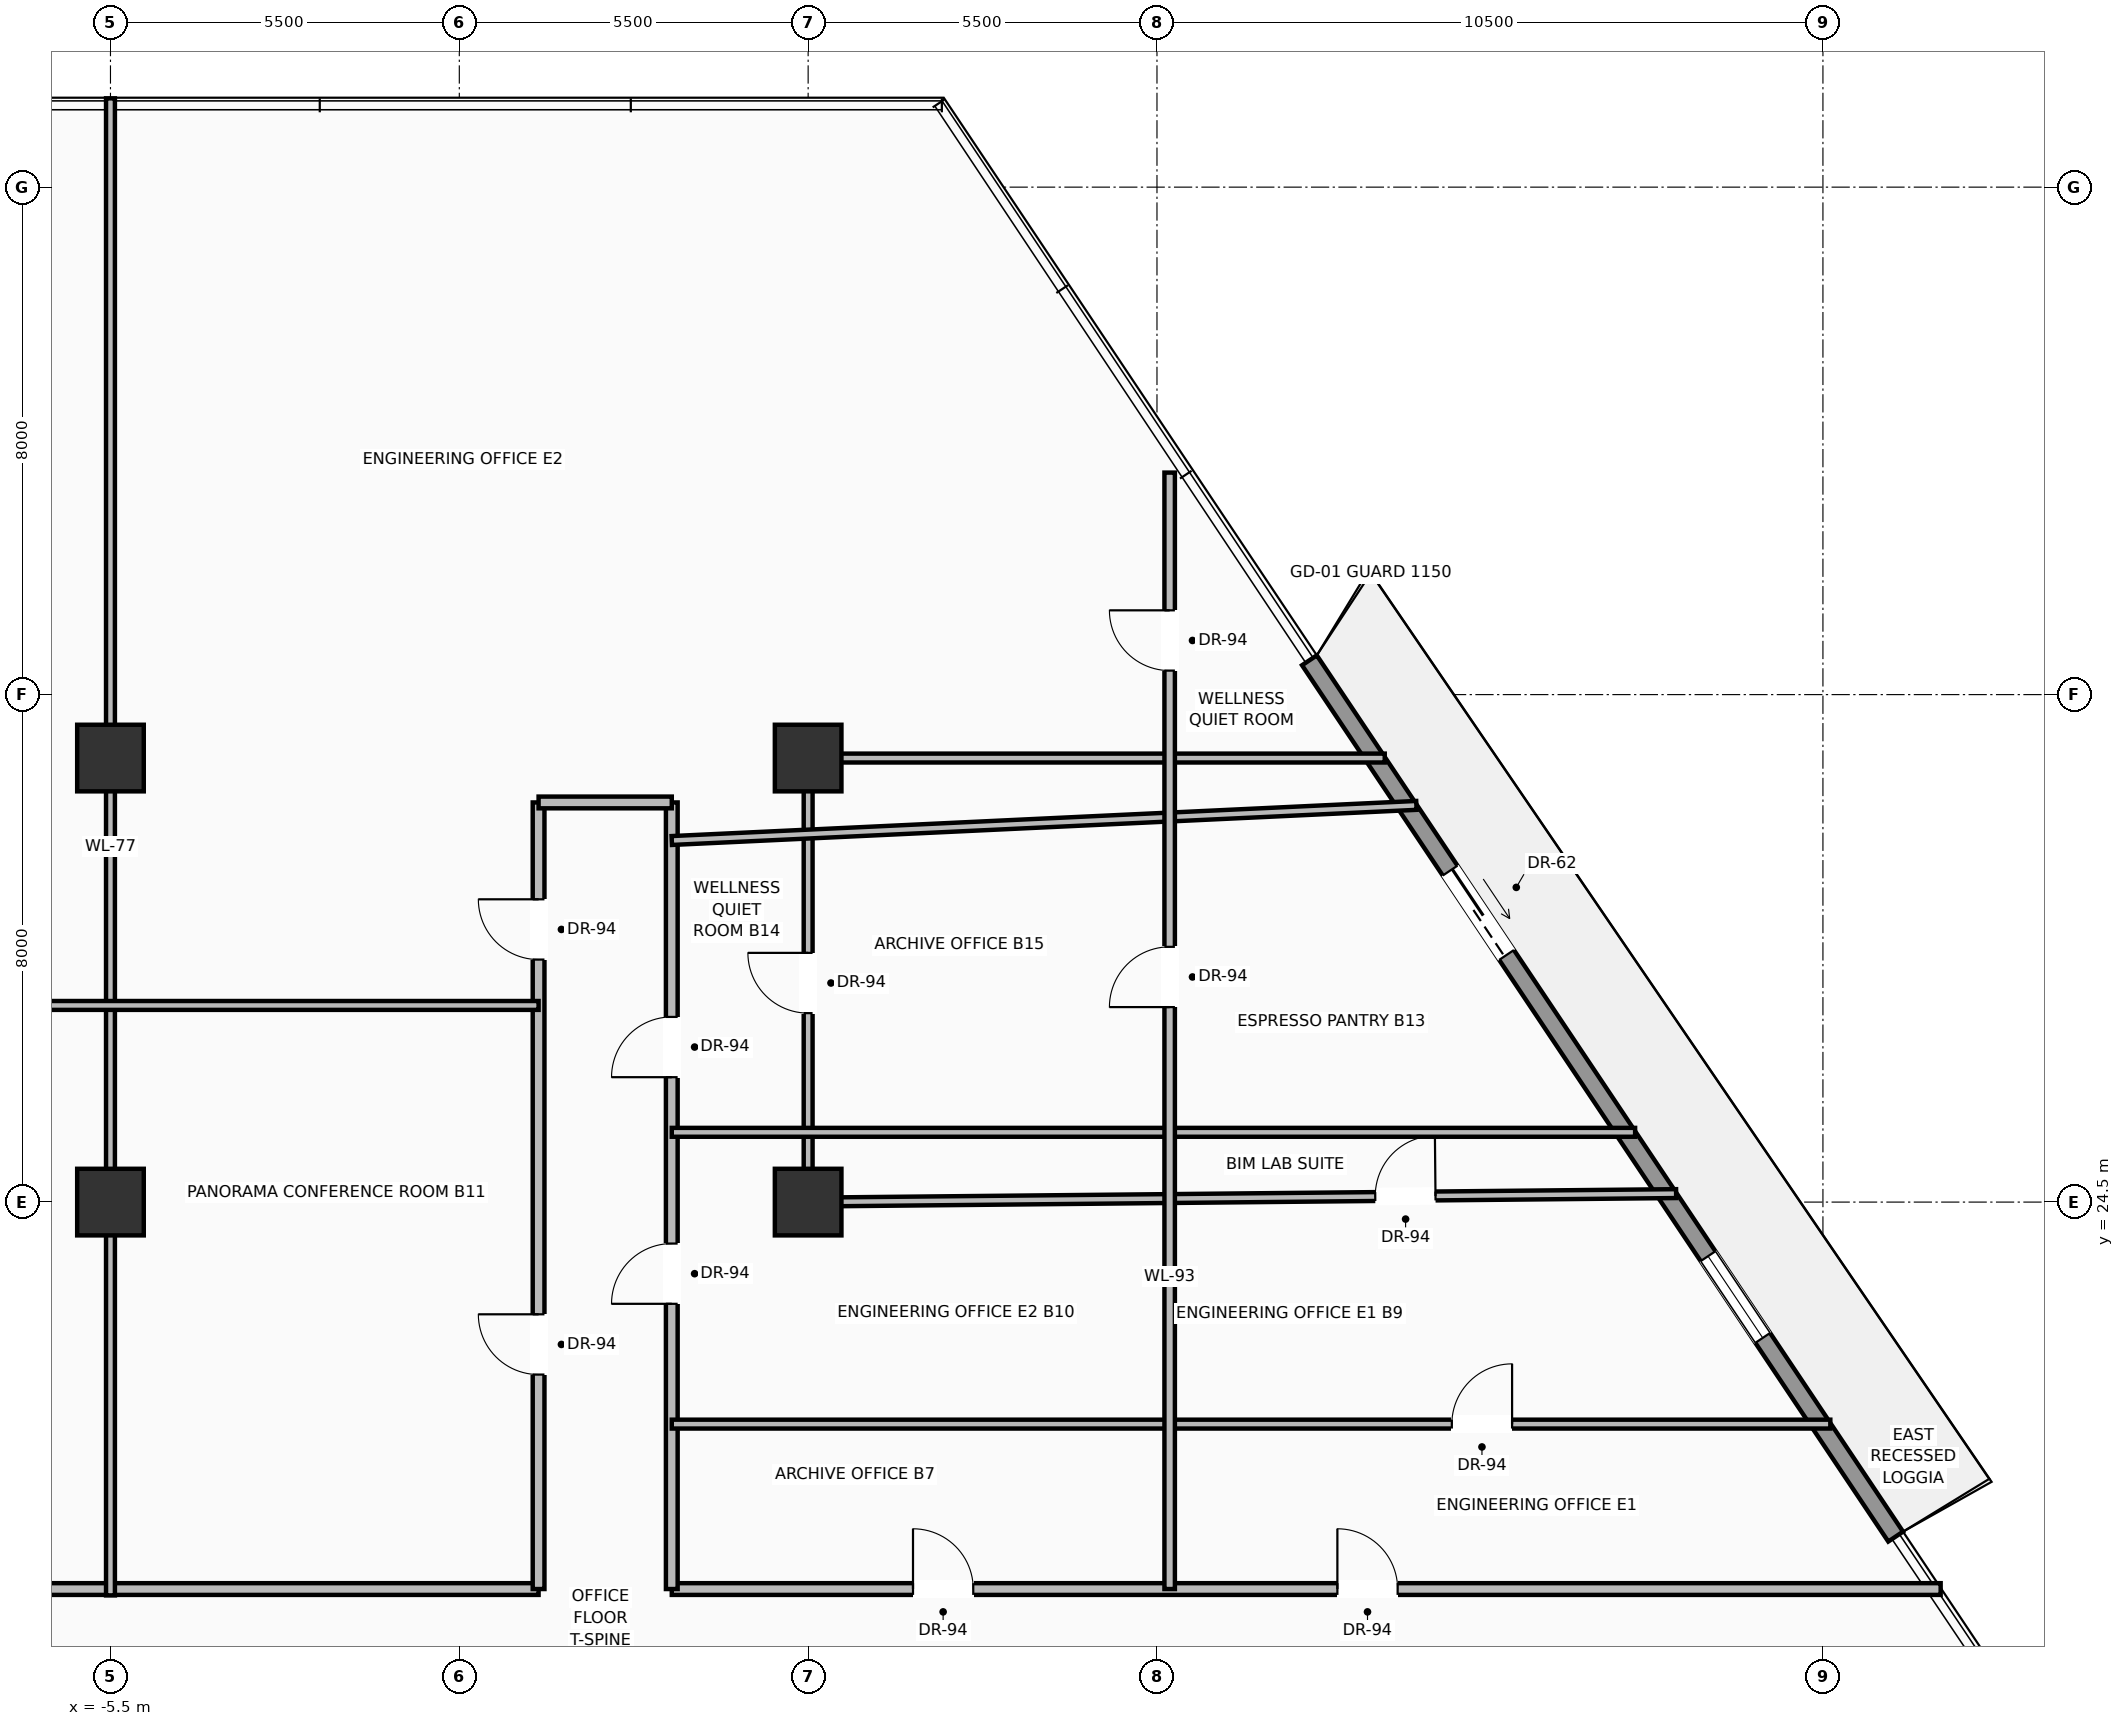
"""IFC4 building model, lengths in metres.
Left out: names, types, materials, properties, quantities, classifications, styles, units other than length and angle.
Written with IfcOpenShell. Run it as: python <this file> out.ifc"""

import sys

from ifc_helpers import new_model, si_unit, direction, frame, frame_2d, origin, origin_2d, place, context, subcontext, project, spatial, rectangle, extrude, source, transform, mapped, element, fill, save


model = new_model("IFC4")
c1 = context("Model", 3, precision=1e-05, world=origin(), true_north=direction((0.0, 1.0)))
c2 = subcontext(c1, "Body", "Model", "MODEL_VIEW")
j1 = project(units=[si_unit("LENGTHUNIT", "METRE"), si_unit("PLANEANGLEUNIT", "RADIAN")], contexts=[c1])
p1 = place(None, origin())
s1 = spatial("IfcSite", under=j1, at=p1, CompositionType="ELEMENT")
p2 = place(p1, origin())
s2 = spatial("IfcBuilding", under=s1, at=p2, CompositionType="ELEMENT")
p3 = place(p2, frame((0.0, 0.0, 49.7)))
s3 = spatial("IfcBuildingStorey", under=s2, at=p3, CompositionType="ELEMENT", Elevation=49.7)
m1 = source(origin(), c2, "Body", "SweptSolid", [
    extrude(rectangle(XDim=1.05, YDim=1.05, at=origin_2d()), origin(), (0.0, 0.0, 1.0), 3.7),
])
for number, where, z_axis, x_axis in (
    (1, (-5.5, 24.5, 0.0), (0.0, 0.0, 1.0), (1.0, 0.0, 0.0)),
    (2, (5.5, 24.5, 0.0), (0.0, 0.0, 1.0), (1.0, 0.0, 0.0)),
    (3, (-5.5, 31.5, 0.0), (0.0, 0.0, 1.0), (1.0, 0.0, 0.0)),
    (4, (5.5, 31.5, 0.0), (0.0, 0.0, 1.0), (1.0, 0.0, 0.0)),
):
    element("IfcColumn", number, at=place(p3, frame(where, z_axis=z_axis, x_axis=x_axis)), inside=s3, PredefinedType="COLUMN", context=c2, shape_type="MappedRepresentation", body=[
        mapped(m1, transform((0.0, 0.0, 0.0), scale=1.0)),
    ])
p4 = place(p3, frame((13.404, 33.041, 0.0), z_axis=(0.0, 0.0, 1.0), x_axis=(0.556075632993, -0.831131692569, 0.0)))
e5 = element("IfcWall", 5, at=p4, inside=s3, PredefinedType="SOLIDWALL", context=c2, shape_type="SweptSolid", body=[
    extrude(rectangle(XDim=16.621, YDim=0.28, at=frame_2d((8.311, 0.0))), origin(), (0.0, 0.0, 1.0), 3.03),
])
p5 = place(p4, frame((3.989, 0.0, 0.0)))
e6 = element("IfcOpeningElement", 6, at=p5, cuts=e5, PredefinedType="OPENING", context=c2, shape_type="SweptSolid", body=[
    extrude(rectangle(XDim=1.6, YDim=2.35, at=frame_2d((0.8, 1.175))), frame((0.0, 0.15, 0.0), z_axis=(0.0, -1.0, 0.0), x_axis=(1.0, 0.0, 0.0)), (0.0, 0.0, 1.0), 0.3),
])
p6 = place(p4, frame((11.302, 0.0, 0.9)))
e7 = element("IfcOpeningElement", 7, at=p6, cuts=e5, PredefinedType="OPENING", context=c2, shape_type="SweptSolid", body=[
    extrude(rectangle(XDim=1.55, YDim=1.85, at=frame_2d((0.775, 0.925))), frame((0.0, 0.15, 0.0), z_axis=(0.0, -1.0, 0.0), x_axis=(1.0, 0.0, 0.0)), (0.0, 0.0, 1.0), 0.3),
])
p7 = place(p3, frame((-23.135, 18.4, 0.0), z_axis=(0.0, 0.0, 1.0), x_axis=(1.0, 0.0, 0.0)))
e8 = element("IfcWall", 8, at=p7, inside=s3, PredefinedType="PARTITIONING", context=c2, shape_type="SweptSolid", body=[
    extrude(rectangle(XDim=24.385, YDim=0.185, at=frame_2d((12.192, 0.0))), origin(), (0.0, 0.0, 1.0), 2.747),
])
p8 = place(p7, frame((10.532, 0.0, 0.0)))
e9 = element("IfcOpeningElement", 9, at=p8, cuts=e8, PredefinedType="OPENING", context=c2, shape_type="SweptSolid", body=[
    extrude(rectangle(XDim=0.95, YDim=2.2, at=frame_2d((0.475, 1.1))), frame((0.0, 0.103, 0.0), z_axis=(0.0, -1.0, 0.0), x_axis=(1.0, 0.0, 0.0)), (0.0, 0.0, 1.0), 0.205),
])
p9 = place(p3, frame((3.35, 18.4, 0.0), z_axis=(0.0, 0.0, 1.0), x_axis=(1.0, 0.0, 0.0)))
e10 = element("IfcWall", 10, at=p9, inside=s3, PredefinedType="PARTITIONING", context=c2, shape_type="SweptSolid", body=[
    extrude(rectangle(XDim=20.006, YDim=0.185, at=frame_2d((10.003, 0.0))), origin(), (0.0, 0.0, 1.0), 2.747),
])
p10 = place(p9, frame((10.494, 0.0, 0.0)))
e11 = element("IfcOpeningElement", 11, at=p10, cuts=e10, PredefinedType="OPENING", context=c2, shape_type="SweptSolid", body=[
    extrude(rectangle(XDim=0.95, YDim=2.2, at=frame_2d((0.475, 1.1))), frame((0.0, 0.103, 0.0), z_axis=(0.0, -1.0, 0.0), x_axis=(1.0, 0.0, 0.0)), (0.0, 0.0, 1.0), 0.205),
])
p11 = place(p9, frame((3.803, 0.0, 0.0)))
e12 = element("IfcOpeningElement", 12, at=p11, cuts=e10, PredefinedType="OPENING", context=c2, shape_type="SweptSolid", body=[
    extrude(rectangle(XDim=0.95, YDim=2.2, at=frame_2d((0.475, 1.1))), frame((0.0, 0.103, 0.0), z_axis=(0.0, -1.0, 0.0), x_axis=(1.0, 0.0, 0.0)), (0.0, 0.0, 1.0), 0.205),
])
p12 = place(p3, frame((1.25, 18.4, 0.0), z_axis=(0.0, 0.0, 1.0), x_axis=(0.0, 1.0, 0.0)))
e13 = element("IfcWall", 13, at=p12, inside=s3, PredefinedType="PARTITIONING", context=c2, shape_type="SweptSolid", body=[
    extrude(rectangle(XDim=12.4, YDim=0.185, at=frame_2d((6.2, 0.0))), origin(), (0.0, 0.0, 1.0), 2.747),
])
p13 = place(p12, frame((3.381, 0.0, 0.0)))
e14 = element("IfcOpeningElement", 14, at=p13, cuts=e13, PredefinedType="OPENING", context=c2, shape_type="SweptSolid", body=[
    extrude(rectangle(XDim=0.95, YDim=2.2, at=frame_2d((0.475, 1.1))), frame((0.0, 0.103, 0.0), z_axis=(0.0, -1.0, 0.0), x_axis=(1.0, 0.0, 0.0)), (0.0, 0.0, 1.0), 0.205),
])
p14 = place(p12, frame((9.923, 0.0, 0.0)))
e15 = element("IfcOpeningElement", 15, at=p14, cuts=e13, PredefinedType="OPENING", context=c2, shape_type="SweptSolid", body=[
    extrude(rectangle(XDim=0.95, YDim=2.2, at=frame_2d((0.475, 1.1))), frame((0.0, 0.103, 0.0), z_axis=(0.0, -1.0, 0.0), x_axis=(1.0, 0.0, 0.0)), (0.0, 0.0, 1.0), 0.205),
])
p15 = place(p3, frame((3.35, 18.4, 0.0), z_axis=(0.0, 0.0, 1.0), x_axis=(0.0, 1.0, 0.0)))
e16 = element("IfcWall", 16, at=p15, inside=s3, PredefinedType="PARTITIONING", context=c2, shape_type="SweptSolid", body=[
    extrude(rectangle(XDim=12.4, YDim=0.185, at=frame_2d((6.2, 0.0))), origin(), (0.0, 0.0, 1.0), 2.747),
])
p16 = place(p15, frame((8.069, 0.0, 0.0)))
e17 = element("IfcOpeningElement", 17, at=p16, cuts=e16, PredefinedType="OPENING", context=c2, shape_type="SweptSolid", body=[
    extrude(rectangle(XDim=0.95, YDim=2.2, at=frame_2d((0.475, 1.1))), frame((0.0, 0.103, 0.0), z_axis=(0.0, -1.0, 0.0), x_axis=(1.0, 0.0, 0.0)), (0.0, 0.0, 1.0), 0.205),
])
p17 = place(p15, frame((4.496, 0.0, 0.0)))
e18 = element("IfcOpeningElement", 18, at=p17, cuts=e16, PredefinedType="OPENING", context=c2, shape_type="SweptSolid", body=[
    extrude(rectangle(XDim=0.95, YDim=2.2, at=frame_2d((0.475, 1.1))), frame((0.0, 0.103, 0.0), z_axis=(0.0, -1.0, 0.0), x_axis=(1.0, 0.0, 0.0)), (0.0, 0.0, 1.0), 0.205),
])
p18 = place(p3, frame((1.25, 30.8, 0.0), z_axis=(0.0, 0.0, 1.0), x_axis=(1.0, 0.0, 0.0)))
e19 = element("IfcWall", 19, at=p18, inside=s3, PredefinedType="PARTITIONING", context=c2, shape_type="SweptSolid", body=[
    extrude(rectangle(XDim=2.1, YDim=0.185, at=frame_2d((1.05, 0.0))), origin(), (0.0, 0.0, 1.0), 3.442),
])
p19 = place(p3, frame((-5.5, 18.3, 0.0), z_axis=(0.0, 0.0, 1.0), x_axis=(0.0, 1.0, 0.0)))
e20 = element("IfcWall", 20, at=p19, inside=s3, PredefinedType="PARTITIONING", context=c2, shape_type="SweptSolid", body=[
    extrude(rectangle(XDim=23.6, YDim=0.14, at=frame_2d((11.8, 0.0))), origin(), (0.0, 0.0, 1.0), 2.747),
])
p20 = place(p3, frame((5.5, 24.5, 0.0), z_axis=(0.0, 0.0, 1.0), x_axis=(0.999952217235, 0.009775645617, 0.0)))
e21 = element("IfcWall", 21, at=p20, inside=s3, PredefinedType="PARTITIONING", context=c2, shape_type="SweptSolid", body=[
    extrude(rectangle(XDim=13.686, YDim=0.14, at=frame_2d((6.843, 0.0))), origin(), (0.0, 0.0, 1.0), 2.747),
])
p21 = place(p20, frame((8.942, 0.0, 0.0)))
e22 = element("IfcOpeningElement", 22, at=p21, cuts=e21, PredefinedType="OPENING", context=c2, shape_type="SweptSolid", body=[
    extrude(rectangle(XDim=0.95, YDim=2.2, at=frame_2d((0.475, 1.1))), frame((0.0, 0.08, 0.0), z_axis=(0.0, -1.0, 0.0), x_axis=(1.0, 0.0, 0.0)), (0.0, 0.0, 1.0), 0.16),
])
p22 = place(p3, frame((5.5, 24.5, 0.0), z_axis=(0.0, 0.0, 1.0), x_axis=(0.0, 1.0, 0.0)))
e23 = element("IfcWall", 23, at=p22, inside=s3, PredefinedType="PARTITIONING", context=c2, shape_type="SweptSolid", body=[
    extrude(rectangle(XDim=7.0, YDim=0.14, at=frame_2d((3.5, 0.0))), origin(), (0.0, 0.0, 1.0), 2.747),
])
p23 = place(p22, frame((2.979, 0.0, 0.0)))
e24 = element("IfcOpeningElement", 24, at=p23, cuts=e23, PredefinedType="OPENING", context=c2, shape_type="SweptSolid", body=[
    extrude(rectangle(XDim=0.95, YDim=2.2, at=frame_2d((0.475, 1.1))), frame((0.0, 0.08, 0.0), z_axis=(0.0, -1.0, 0.0), x_axis=(1.0, 0.0, 0.0)), (0.0, 0.0, 1.0), 0.16),
])
p24 = place(p3, frame((5.5, 31.5, 0.0), z_axis=(0.0, 0.0, 1.0), x_axis=(1.0, 0.0, 0.0)))
e25 = element("IfcWall", 25, at=p24, inside=s3, PredefinedType="PARTITIONING", context=c2, shape_type="SweptSolid", body=[
    extrude(rectangle(XDim=9.091, YDim=0.14, at=frame_2d((4.545, 0.0))), origin(), (0.0, 0.0, 1.0), 2.747),
])
p25 = place(p3, frame((-16.869, 27.6, 0.0), z_axis=(0.0, 0.0, 1.0), x_axis=(1.0, 0.0, 0.0)))
e26 = element("IfcWall", 26, at=p25, inside=s3, PredefinedType="PARTITIONING", context=c2, shape_type="SweptSolid", body=[
    extrude(rectangle(XDim=18.119, YDim=0.14, at=frame_2d((9.059, 0.0))), origin(), (0.0, 0.0, 1.0), 2.747),
])
p26 = place(p25, frame((5.481, 0.0, 0.0)))
e27 = element("IfcOpeningElement", 27, at=p26, cuts=e26, PredefinedType="OPENING", context=c2, shape_type="SweptSolid", body=[
    extrude(rectangle(XDim=0.95, YDim=2.2, at=frame_2d((0.475, 1.1))), frame((0.0, 0.08, 0.0), z_axis=(0.0, -1.0, 0.0), x_axis=(1.0, 0.0, 0.0)), (0.0, 0.0, 1.0), 0.16),
])
p27 = place(p3, frame((3.35, 21.0, 0.0), z_axis=(0.0, 0.0, 1.0), x_axis=(1.0, 0.0, 0.0)))
e28 = element("IfcWall", 28, at=p27, inside=s3, PredefinedType="PARTITIONING", context=c2, shape_type="SweptSolid", body=[
    extrude(rectangle(XDim=18.266, YDim=0.14, at=frame_2d((9.133, 0.0))), origin(), (0.0, 0.0, 1.0), 2.747),
])
p28 = place(p27, frame((12.299, 0.0, 0.0)))
e29 = element("IfcOpeningElement", 29, at=p28, cuts=e28, PredefinedType="OPENING", context=c2, shape_type="SweptSolid", body=[
    extrude(rectangle(XDim=0.95, YDim=2.2, at=frame_2d((0.475, 1.1))), frame((0.0, 0.08, 0.0), z_axis=(0.0, -1.0, 0.0), x_axis=(1.0, 0.0, 0.0)), (0.0, 0.0, 1.0), 0.16),
])
p29 = place(p3, frame((3.35, 25.6, 0.0), z_axis=(0.0, 0.0, 1.0), x_axis=(1.0, 0.0, 0.0)))
e30 = element("IfcWall", 30, at=p29, inside=s3, PredefinedType="PARTITIONING", context=c2, shape_type="SweptSolid", body=[
    extrude(rectangle(XDim=15.189, YDim=0.14, at=frame_2d((7.594, 0.0))), origin(), (0.0, 0.0, 1.0), 2.747),
])
p30 = place(p3, frame((3.35, 30.2, 0.0), z_axis=(0.0, 0.0, 1.0), x_axis=(0.998889698703, 0.047110188123, 0.0)))
e31 = element("IfcWall", 31, at=p30, inside=s3, PredefinedType="PARTITIONING", context=c2, shape_type="SweptSolid", body=[
    extrude(rectangle(XDim=11.753, YDim=0.14, at=frame_2d((5.877, 0.0))), origin(), (0.0, 0.0, 1.0), 2.747),
])
p31 = place(p3, frame((11.2, 18.4, 0.0), z_axis=(0.0, 0.0, 1.0), x_axis=(0.0, 1.0, 0.0)))
e32 = element("IfcWall", 32, at=p31, inside=s3, PredefinedType="PARTITIONING", context=c2, shape_type="SweptSolid", body=[
    extrude(rectangle(XDim=17.6, YDim=0.165, at=frame_2d((8.8, 0.0))), origin(), (0.0, 0.0, 1.0), 2.747),
])
p32 = place(p31, frame((9.174, 0.0, 0.0)))
e33 = element("IfcOpeningElement", 33, at=p32, cuts=e32, PredefinedType="OPENING", context=c2, shape_type="SweptSolid", body=[
    extrude(rectangle(XDim=0.95, YDim=2.2, at=frame_2d((0.475, 1.1))), frame((0.0, 0.093, 0.0), z_axis=(0.0, -1.0, 0.0), x_axis=(1.0, 0.0, 0.0)), (0.0, 0.0, 1.0), 0.185),
])
p33 = place(p31, frame((14.479, 0.0, 0.0)))
e34 = element("IfcOpeningElement", 34, at=p33, cuts=e32, PredefinedType="OPENING", context=c2, shape_type="SweptSolid", body=[
    extrude(rectangle(XDim=0.95, YDim=2.2, at=frame_2d((0.475, 1.1))), frame((0.0, 0.093, 0.0), z_axis=(0.0, -1.0, 0.0), x_axis=(1.0, 0.0, 0.0)), (0.0, 0.0, 1.0), 0.185),
])
m2 = source(origin(), c2, "Body", "SweptSolid", [
    extrude(rectangle(XDim=1.6, YDim=2.35, at=frame_2d((0.8, 1.175))), frame((0.0, 0.025, 0.0), z_axis=(0.0, -1.0, 0.0), x_axis=(1.0, 0.0, 0.0)), (0.0, 0.0, 1.0), 0.05),
])
p34 = place(p5, origin())
e35 = element("IfcDoor", 35, at=p34, inside=s3, OperationType="SLIDING_TO_RIGHT", PredefinedType="DOOR", context=c2, shape_type="MappedRepresentation", body=[
    mapped(m2, transform((0.0, 0.0, 0.0), scale=1.0)),
])
fill(e6, e35)
m3 = source(origin(), c2, "Body", "SweptSolid", [
    extrude(rectangle(XDim=1.55, YDim=1.85, at=frame_2d((0.775, 0.925))), frame((0.0, 0.03, 0.0), z_axis=(0.0, -1.0, 0.0), x_axis=(1.0, 0.0, 0.0)), (0.0, 0.0, 1.0), 0.06),
])
p35 = place(p6, origin())
e36 = element("IfcWindow", 36, at=p35, inside=s3, PartitioningType="SINGLE_PANEL", PredefinedType="WINDOW", context=c2, shape_type="MappedRepresentation", body=[
    mapped(m3, transform((0.0, 0.0, 0.0), scale=1.0)),
])
fill(e7, e36)
m4 = source(origin(), c2, "Body", "SweptSolid", [
    extrude(rectangle(XDim=0.95, YDim=2.2, at=frame_2d((0.475, 1.1))), frame((0.0, 0.025, 0.0), z_axis=(0.0, -1.0, 0.0), x_axis=(1.0, 0.0, 0.0)), (0.0, 0.0, 1.0), 0.05),
])
p36 = place(p10, origin())
e37 = element("IfcDoor", 37, at=p36, inside=s3, OperationType="SINGLE_SWING_LEFT", PredefinedType="DOOR", context=c2, shape_type="MappedRepresentation", body=[
    mapped(m4, transform((0.0, 0.0, 0.0), scale=1.0)),
])
fill(e11, e37)
p37 = place(p13, origin())
e38 = element("IfcDoor", 38, at=p37, inside=s3, OperationType="SINGLE_SWING_RIGHT", PredefinedType="DOOR", context=c2, shape_type="MappedRepresentation", body=[
    mapped(m4, transform((0.0, 0.0, 0.0), scale=1.0)),
])
fill(e14, e38)
p38 = place(p16, origin())
e39 = element("IfcDoor", 39, at=p38, inside=s3, OperationType="SINGLE_SWING_LEFT", PredefinedType="DOOR", context=c2, shape_type="MappedRepresentation", body=[
    mapped(m4, transform((0.0, 0.0, 0.0), scale=1.0)),
])
fill(e17, e39)
p39 = place(p11, origin())
e40 = element("IfcDoor", 40, at=p39, inside=s3, OperationType="SINGLE_SWING_LEFT", PredefinedType="DOOR", context=c2, shape_type="MappedRepresentation", body=[
    mapped(m4, transform((0.0, 0.0, 0.0), scale=1.0)),
])
fill(e12, e40)
p40 = place(p28, origin())
e41 = element("IfcDoor", 41, at=p40, inside=s3, OperationType="SINGLE_SWING_RIGHT", PredefinedType="DOOR", context=c2, shape_type="MappedRepresentation", body=[
    mapped(m4, transform((0.0, 0.0, 0.0), scale=1.0)),
])
fill(e29, e41)
p41 = place(p17, origin())
e42 = element("IfcDoor", 42, at=p41, inside=s3, OperationType="SINGLE_SWING_LEFT", PredefinedType="DOOR", context=c2, shape_type="MappedRepresentation", body=[
    mapped(m4, transform((0.0, 0.0, 0.0), scale=1.0)),
])
fill(e18, e42)
p42 = place(p23, origin())
e43 = element("IfcDoor", 43, at=p42, inside=s3, OperationType="SINGLE_SWING_RIGHT", PredefinedType="DOOR", context=c2, shape_type="MappedRepresentation", body=[
    mapped(m4, transform((0.0, 0.0, 0.0), scale=1.0)),
])
fill(e24, e43)
p43 = place(p14, origin())
e44 = element("IfcDoor", 44, at=p43, inside=s3, OperationType="SINGLE_SWING_RIGHT", PredefinedType="DOOR", context=c2, shape_type="MappedRepresentation", body=[
    mapped(m4, transform((0.0, 0.0, 0.0), scale=1.0)),
])
fill(e15, e44)
p44 = place(p21, origin())
e45 = element("IfcDoor", 45, at=p44, inside=s3, OperationType="SINGLE_SWING_RIGHT", PredefinedType="DOOR", context=c2, shape_type="MappedRepresentation", body=[
    mapped(m4, transform((0.0, 0.0, 0.0), scale=1.0)),
])
fill(e22, e45)
p45 = place(p32, origin())
e46 = element("IfcDoor", 46, at=p45, inside=s3, OperationType="SINGLE_SWING_LEFT", PredefinedType="DOOR", context=c2, shape_type="MappedRepresentation", body=[
    mapped(m4, transform((0.0, 0.0, 0.0), scale=1.0)),
])
fill(e33, e46)
p46 = place(p33, origin())
e47 = element("IfcDoor", 47, at=p46, inside=s3, OperationType="SINGLE_SWING_RIGHT", PredefinedType="DOOR", context=c2, shape_type="MappedRepresentation", body=[
    mapped(m4, transform((0.0, 0.0, 0.0), scale=1.0)),
])
fill(e34, e47)
save(model, sys.argv[1])
